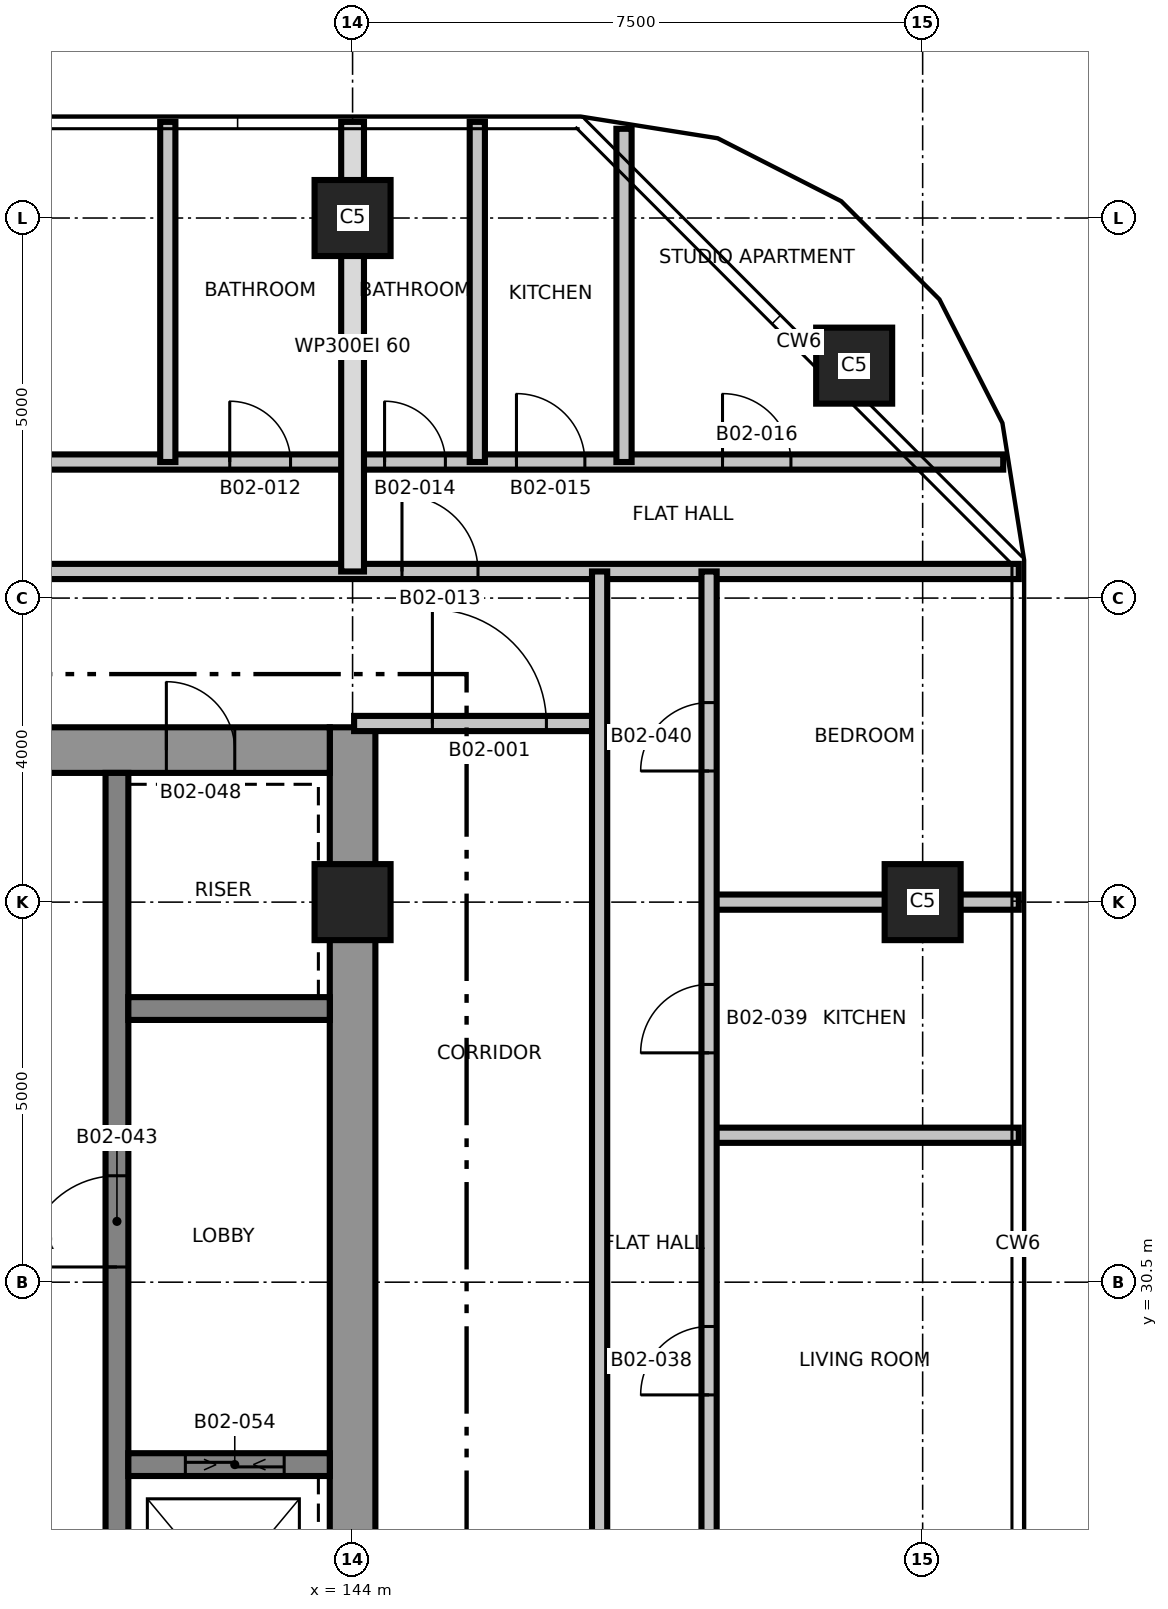
"""IFC4 building model, lengths in metres.
Left out: names, types, materials, properties, quantities, classifications, styles, units other than length and angle.
Written with IfcOpenShell. Run it as: python <this file> out.ifc"""

import sys

from ifc_helpers import new_model, si_unit, direction, frame, frame_2d, origin, origin_2d, place, context, subcontext, project, spatial, rectangle, extrude, element, fill, save


model = new_model("IFC4")
c1 = context("Model", 3, precision=1e-05, world=origin(), true_north=direction((0.0, 1.0)))
c2 = subcontext(c1, "Body", "Model", "MODEL_VIEW")
j1 = project(units=[si_unit("LENGTHUNIT", "METRE"), si_unit("PLANEANGLEUNIT", "RADIAN")], contexts=[c1])
p1 = place(None, origin())
s1 = spatial("IfcSite", under=j1, at=p1, CompositionType="ELEMENT")
p2 = place(p1, origin())
s2 = spatial("IfcBuilding", under=s1, at=p2, CompositionType="ELEMENT")
p3 = place(p2, frame((0.0, 0.0, 44.6)))
s3 = spatial("IfcBuildingStorey", under=s2, at=p3, CompositionType="ELEMENT", Elevation=44.6)
p4 = place(p3, frame((144.0, 24.2, 0.0), z_axis=(0.0, 0.0, 1.0), x_axis=(0.0, 1.0, 0.0)))
e1 = element("IfcWall", 1, at=p4, inside=s3, PredefinedType="SHEAR", context=c2, shape_type="SweptSolid", body=[
    extrude(rectangle(XDim=13.6, YDim=0.6, at=frame_2d((6.8, 0.0))), origin(), (0.0, 0.0, 1.0), 3.7),
])
p5 = place(p3, frame((128.7, 37.5, 0.0), z_axis=(0.0, 0.0, 1.0), x_axis=(1.0, 0.0, 0.0)))
e2 = element("IfcWall", 2, at=p5, inside=s3, PredefinedType="SHEAR", context=c2, shape_type="SweptSolid", body=[
    extrude(rectangle(XDim=15.0, YDim=0.6, at=frame_2d((7.5, 0.0))), origin(), (0.0, 0.0, 1.0), 3.7),
])
p6 = place(p5, frame((9.65, 0.0, 0.0)))
e3 = element("IfcOpeningElement", 3, at=p6, cuts=e2, PredefinedType="OPENING", context=c2, shape_type="SweptSolid", body=[
    extrude(rectangle(XDim=1.5, YDim=2.1, at=frame_2d((0.75, 1.05))), frame((0.0, 0.31, 0.0), z_axis=(0.0, -1.0, 0.0), x_axis=(1.0, 0.0, 0.0)), (0.0, 0.0, 1.0), 0.62),
])
p7 = place(p5, frame((12.85, 0.0, 0.0)))
e4 = element("IfcOpeningElement", 4, at=p7, cuts=e2, PredefinedType="OPENING", context=c2, shape_type="SweptSolid", body=[
    extrude(rectangle(XDim=0.9, YDim=2.1, at=frame_2d((0.45, 1.05))), frame((0.0, 0.31, 0.0), z_axis=(0.0, -1.0, 0.0), x_axis=(1.0, 0.0, 0.0)), (0.0, 0.0, 1.0), 0.62),
])
p8 = place(p5, frame((5.55, 0.0, 0.0)))
e5 = element("IfcOpeningElement", 5, at=p8, cuts=e2, PredefinedType="OPENING", context=c2, shape_type="SweptSolid", body=[
    extrude(rectangle(XDim=0.9, YDim=2.1, at=frame_2d((0.45, 1.05))), frame((0.0, 0.31, 0.0), z_axis=(0.0, -1.0, 0.0), x_axis=(1.0, 0.0, 0.0)), (0.0, 0.0, 1.0), 0.62),
])
p9 = place(p3, frame((140.9, 24.8, 0.0), z_axis=(0.0, 0.0, 1.0), x_axis=(0.0, 1.0, 0.0)))
e6 = element("IfcWall", 6, at=p9, inside=s3, PredefinedType="SHEAR", context=c2, shape_type="SweptSolid", body=[
    extrude(rectangle(XDim=12.4, YDim=0.3, at=frame_2d((6.2, 0.0))), origin(), (0.0, 0.0, 1.0), 3.7),
])
p10 = place(p9, frame((5.9, 0.0, 0.0)))
e7 = element("IfcOpeningElement", 7, at=p10, cuts=e6, PredefinedType="OPENING", context=c2, shape_type="SweptSolid", body=[
    extrude(rectangle(XDim=1.2, YDim=2.1, at=frame_2d((0.6, 1.05))), frame((0.0, 0.16, 0.0), z_axis=(0.0, -1.0, 0.0), x_axis=(1.0, 0.0, 0.0)), (0.0, 0.0, 1.0), 0.32),
])
p11 = place(p3, frame((141.05, 28.1, 0.0), z_axis=(0.0, 0.0, 1.0), x_axis=(1.0, 0.0, 0.0)))
e8 = element("IfcWall", 8, at=p11, inside=s3, PredefinedType="SHEAR", context=c2, shape_type="SweptSolid", body=[
    extrude(rectangle(XDim=2.65, YDim=0.3, at=frame_2d((1.325, 0.0))), origin(), (0.0, 0.0, 1.0), 3.7),
])
p12 = place(p11, frame((0.75, 0.0, 0.0)))
e9 = element("IfcOpeningElement", 9, at=p12, cuts=e8, PredefinedType="OPENING", context=c2, shape_type="SweptSolid", body=[
    extrude(rectangle(XDim=1.3, YDim=2.4, at=frame_2d((0.65, 1.2))), frame((0.0, 0.16, 0.0), z_axis=(0.0, -1.0, 0.0), x_axis=(1.0, 0.0, 0.0)), (0.0, 0.0, 1.0), 0.32),
])
p13 = place(p3, frame((141.05, 34.1, 0.0), z_axis=(0.0, 0.0, 1.0), x_axis=(1.0, 0.0, 0.0)))
e10 = element("IfcWall", 10, at=p13, inside=s3, PredefinedType="SHEAR", context=c2, shape_type="SweptSolid", body=[
    extrude(rectangle(XDim=2.65, YDim=0.3, at=frame_2d((1.325, 0.0))), origin(), (0.0, 0.0, 1.0), 3.7),
])
for number, where, z_axis, x_axis in (
    (11, (144.0, 35.5, 0.0), (0.0, 0.0, 1.0), (1.0, 0.0, 0.0)),
    (12, (151.5, 35.5, 0.0), (0.0, 0.0, 1.0), (1.0, 0.0, 0.0)),
    (13, (150.599, 42.558, 0.0), (0.0, 0.0, 1.0), (1.0, 0.0, 0.0)),
    (14, (144.0, 44.5, 0.0), (0.0, 0.0, 1.0), (1.0, 0.0, 0.0)),
):
    element("IfcColumn", number, at=place(p3, frame(where, z_axis=z_axis, x_axis=x_axis)), inside=s3, PredefinedType="COLUMN", context=c2, shape_type="SweptSolid", body=[
        extrude(rectangle(XDim=1.0, YDim=1.0, at=origin_2d()), origin(), (0.0, 0.0, 1.0), 3.7),
    ])
for number, where, z_axis, x_axis in (
    (15, (148.69, 32.433, 0.0), (0.0, 0.0, 1.0), (1.0, 0.0, 0.0)),
    (16, (148.69, 35.5, 0.0), (0.0, 0.0, 1.0), (1.0, 0.0, 0.0)),
):
    element("IfcWall", number, at=place(p3, frame(where, z_axis=z_axis, x_axis=x_axis)), inside=s3, PredefinedType="PARTITIONING", context=c2, shape_type="SweptSolid", body=[
        extrude(rectangle(XDim=4.075, YDim=0.2, at=frame_2d((2.038, 0.0))), origin(), (0.0, 0.0, 1.0), 3.4),
    ])
p14 = place(p3, frame((144.02, 37.85, 0.0), z_axis=(0.0, 0.0, 1.0), x_axis=(1.0, 0.0, 0.0)))
e17 = element("IfcWall", 17, at=p14, inside=s3, PredefinedType="PARTITIONING", context=c2, shape_type="SweptSolid", body=[
    extrude(rectangle(XDim=3.23, YDim=0.2, at=frame_2d((1.615, 0.0))), origin(), (0.0, 0.0, 1.0), 3.4),
])
p15 = place(p14, frame((1.03, 0.0, 0.0)))
e18 = element("IfcOpeningElement", 18, at=p15, cuts=e17, PredefinedType="OPENING", context=c2, shape_type="SweptSolid", body=[
    extrude(rectangle(XDim=1.5, YDim=2.1, at=frame_2d((0.75, 1.05))), frame((0.0, 0.11, 0.0), z_axis=(0.0, -1.0, 0.0), x_axis=(1.0, 0.0, 0.0)), (0.0, 0.0, 1.0), 0.22),
])
p16 = place(p3, frame((120.235, 39.85, 0.0), z_axis=(0.0, 0.0, 1.0), x_axis=(1.0, 0.0, 0.0)))
e19 = element("IfcWall", 19, at=p16, inside=s3, PredefinedType="PARTITIONING", context=c2, shape_type="SweptSolid", body=[
    extrude(rectangle(XDim=32.53, YDim=0.2, at=frame_2d((16.265, 0.0))), origin(), (0.0, 0.0, 1.0), 3.4),
])
p17 = place(p16, frame((7.115, 0.0, 0.0)))
e20 = element("IfcOpeningElement", 20, at=p17, cuts=e19, PredefinedType="OPENING", context=c2, shape_type="SweptSolid", body=[
    extrude(rectangle(XDim=1.0, YDim=2.1, at=frame_2d((0.5, 1.05))), frame((0.0, 0.11, 0.0), z_axis=(0.0, -1.0, 0.0), x_axis=(1.0, 0.0, 0.0)), (0.0, 0.0, 1.0), 0.22),
])
p18 = place(p16, frame((15.765, 0.0, 0.0)))
e21 = element("IfcOpeningElement", 21, at=p18, cuts=e19, PredefinedType="OPENING", context=c2, shape_type="SweptSolid", body=[
    extrude(rectangle(XDim=1.0, YDim=2.1, at=frame_2d((0.5, 1.05))), frame((0.0, 0.11, 0.0), z_axis=(0.0, -1.0, 0.0), x_axis=(1.0, 0.0, 0.0)), (0.0, 0.0, 1.0), 0.22),
])
p19 = place(p16, frame((24.415, 0.0, 0.0)))
e22 = element("IfcOpeningElement", 22, at=p19, cuts=e19, PredefinedType="OPENING", context=c2, shape_type="SweptSolid", body=[
    extrude(rectangle(XDim=1.0, YDim=2.1, at=frame_2d((0.5, 1.05))), frame((0.0, 0.11, 0.0), z_axis=(0.0, -1.0, 0.0), x_axis=(1.0, 0.0, 0.0)), (0.0, 0.0, 1.0), 0.22),
])
p20 = place(p3, frame((120.44, 41.29, 0.0), z_axis=(0.0, 0.0, 1.0), x_axis=(1.0, 0.0, 0.0)))
e23 = element("IfcWall", 23, at=p20, inside=s3, PredefinedType="PARTITIONING", context=c2, shape_type="SweptSolid", body=[
    extrude(rectangle(XDim=32.12, YDim=0.2, at=frame_2d((16.06, 0.0))), origin(), (0.0, 0.0, 1.0), 3.4),
])
p21 = place(p20, frame((2.793, 0.0, 0.0)))
e24 = element("IfcOpeningElement", 24, at=p21, cuts=e23, PredefinedType="OPENING", context=c2, shape_type="SweptSolid", body=[
    extrude(rectangle(XDim=0.9, YDim=2.1, at=frame_2d((0.45, 1.05))), frame((0.0, 0.11, 0.0), z_axis=(0.0, -1.0, 0.0), x_axis=(1.0, 0.0, 0.0)), (0.0, 0.0, 1.0), 0.22),
])
p22 = place(p20, frame((5.504, 0.0, 0.0)))
e25 = element("IfcOpeningElement", 25, at=p22, cuts=e23, PredefinedType="OPENING", context=c2, shape_type="SweptSolid", body=[
    extrude(rectangle(XDim=0.9, YDim=2.1, at=frame_2d((0.45, 1.05))), frame((0.0, 0.11, 0.0), z_axis=(0.0, -1.0, 0.0), x_axis=(1.0, 0.0, 0.0)), (0.0, 0.0, 1.0), 0.22),
])
p23 = place(p20, frame((7.339, 0.0, 0.0)))
e26 = element("IfcOpeningElement", 26, at=p23, cuts=e23, PredefinedType="OPENING", context=c2, shape_type="SweptSolid", body=[
    extrude(rectangle(XDim=0.8, YDim=2.1, at=frame_2d((0.4, 1.05))), frame((0.0, 0.11, 0.0), z_axis=(0.0, -1.0, 0.0), x_axis=(1.0, 0.0, 0.0)), (0.0, 0.0, 1.0), 0.22),
])
p24 = place(p20, frame((10.577, 0.0, 0.0)))
e27 = element("IfcOpeningElement", 27, at=p24, cuts=e23, PredefinedType="OPENING", context=c2, shape_type="SweptSolid", body=[
    extrude(rectangle(XDim=0.9, YDim=2.1, at=frame_2d((0.45, 1.05))), frame((0.0, 0.11, 0.0), z_axis=(0.0, -1.0, 0.0), x_axis=(1.0, 0.0, 0.0)), (0.0, 0.0, 1.0), 0.22),
])
p25 = place(p20, frame((14.327, 0.0, 0.0)))
e28 = element("IfcOpeningElement", 28, at=p25, cuts=e23, PredefinedType="OPENING", context=c2, shape_type="SweptSolid", body=[
    extrude(rectangle(XDim=0.9, YDim=2.1, at=frame_2d((0.45, 1.05))), frame((0.0, 0.11, 0.0), z_axis=(0.0, -1.0, 0.0), x_axis=(1.0, 0.0, 0.0)), (0.0, 0.0, 1.0), 0.22),
])
p26 = place(p20, frame((18.144, 0.0, 0.0)))
e29 = element("IfcOpeningElement", 29, at=p26, cuts=e23, PredefinedType="OPENING", context=c2, shape_type="SweptSolid", body=[
    extrude(rectangle(XDim=0.9, YDim=2.1, at=frame_2d((0.45, 1.05))), frame((0.0, 0.11, 0.0), z_axis=(0.0, -1.0, 0.0), x_axis=(1.0, 0.0, 0.0)), (0.0, 0.0, 1.0), 0.22),
])
p27 = place(p20, frame((21.944, 0.0, 0.0)))
e30 = element("IfcOpeningElement", 30, at=p27, cuts=e23, PredefinedType="OPENING", context=c2, shape_type="SweptSolid", body=[
    extrude(rectangle(XDim=0.8, YDim=2.1, at=frame_2d((0.4, 1.05))), frame((0.0, 0.11, 0.0), z_axis=(0.0, -1.0, 0.0), x_axis=(1.0, 0.0, 0.0)), (0.0, 0.0, 1.0), 0.22),
])
p28 = place(p20, frame((23.981, 0.0, 0.0)))
e31 = element("IfcOpeningElement", 31, at=p28, cuts=e23, PredefinedType="OPENING", context=c2, shape_type="SweptSolid", body=[
    extrude(rectangle(XDim=0.8, YDim=2.1, at=frame_2d((0.4, 1.05))), frame((0.0, 0.11, 0.0), z_axis=(0.0, -1.0, 0.0), x_axis=(1.0, 0.0, 0.0)), (0.0, 0.0, 1.0), 0.22),
])
p29 = place(p20, frame((25.716, 0.0, 0.0)))
e32 = element("IfcOpeningElement", 32, at=p29, cuts=e23, PredefinedType="OPENING", context=c2, shape_type="SweptSolid", body=[
    extrude(rectangle(XDim=0.9, YDim=2.1, at=frame_2d((0.45, 1.05))), frame((0.0, 0.11, 0.0), z_axis=(0.0, -1.0, 0.0), x_axis=(1.0, 0.0, 0.0)), (0.0, 0.0, 1.0), 0.22),
])
p30 = place(p20, frame((28.427, 0.0, 0.0)))
e33 = element("IfcOpeningElement", 33, at=p30, cuts=e23, PredefinedType="OPENING", context=c2, shape_type="SweptSolid", body=[
    extrude(rectangle(XDim=0.9, YDim=2.1, at=frame_2d((0.45, 1.05))), frame((0.0, 0.11, 0.0), z_axis=(0.0, -1.0, 0.0), x_axis=(1.0, 0.0, 0.0)), (0.0, 0.0, 1.0), 0.22),
])
p31 = place(p3, frame((141.569, 41.29, 0.0), z_axis=(0.0, 0.0, 1.0), x_axis=(0.0, 1.0, 0.0)))
e34 = element("IfcWall", 34, at=p31, inside=s3, PredefinedType="PARTITIONING", context=c2, shape_type="SweptSolid", body=[
    extrude(rectangle(XDim=4.475, YDim=0.2, at=frame_2d((2.237, 0.0))), origin(), (0.0, 0.0, 1.0), 3.4),
])
p32 = place(p3, frame((144.0, 39.85, 0.0), z_axis=(0.0, 0.0, 1.0), x_axis=(0.0, 1.0, 0.0)))
e35 = element("IfcWall", 35, at=p32, inside=s3, PredefinedType="PARTITIONING", context=c2, shape_type="SweptSolid", body=[
    extrude(rectangle(XDim=5.915, YDim=0.3, at=frame_2d((2.958, 0.0))), origin(), (0.0, 0.0, 1.0), 3.4),
])
p33 = place(p3, frame((145.641, 41.29, 0.0), z_axis=(0.0, 0.0, 1.0), x_axis=(0.0, 1.0, 0.0)))
e36 = element("IfcWall", 36, at=p33, inside=s3, PredefinedType="PARTITIONING", context=c2, shape_type="SweptSolid", body=[
    extrude(rectangle(XDim=4.475, YDim=0.2, at=frame_2d((2.237, 0.0))), origin(), (0.0, 0.0, 1.0), 3.4),
])
p34 = place(p3, frame((147.25, 22.15, 0.0), z_axis=(0.0, 0.0, 1.0), x_axis=(0.0, 1.0, 0.0)))
e37 = element("IfcWall", 37, at=p34, inside=s3, PredefinedType="PARTITIONING", context=c2, shape_type="SweptSolid", body=[
    extrude(rectangle(XDim=17.7, YDim=0.2, at=frame_2d((8.85, 0.0))), origin(), (0.0, 0.0, 1.0), 3.4),
])
p35 = place(p34, frame((2.65, 0.0, 0.0)))
e38 = element("IfcOpeningElement", 38, at=p35, cuts=e37, PredefinedType="OPENING", context=c2, shape_type="SweptSolid", body=[
    extrude(rectangle(XDim=1.0, YDim=2.1, at=frame_2d((0.5, 1.05))), frame((0.0, 0.11, 0.0), z_axis=(0.0, -1.0, 0.0), x_axis=(1.0, 0.0, 0.0)), (0.0, 0.0, 1.0), 0.22),
])
p36 = place(p3, frame((147.571, 41.29, 0.0), z_axis=(0.0, 0.0, 1.0), x_axis=(0.0, 1.0, 0.0)))
e39 = element("IfcWall", 39, at=p36, inside=s3, PredefinedType="PARTITIONING", context=c2, shape_type="SweptSolid", body=[
    extrude(rectangle(XDim=4.384, YDim=0.2, at=frame_2d((2.192, 0.0))), origin(), (0.0, 0.0, 1.0), 3.4),
])
p37 = place(p3, frame((148.69, 22.15, 0.0), z_axis=(0.0, 0.0, 1.0), x_axis=(0.0, 1.0, 0.0)))
e40 = element("IfcWall", 40, at=p37, inside=s3, PredefinedType="PARTITIONING", context=c2, shape_type="SweptSolid", body=[
    extrude(rectangle(XDim=17.7, YDim=0.2, at=frame_2d((8.85, 0.0))), origin(), (0.0, 0.0, 1.0), 3.4),
])
p38 = place(p37, frame((1.028, 0.0, 0.0)))
e41 = element("IfcOpeningElement", 41, at=p38, cuts=e40, PredefinedType="OPENING", context=c2, shape_type="SweptSolid", body=[
    extrude(rectangle(XDim=0.9, YDim=2.1, at=frame_2d((0.45, 1.05))), frame((0.0, 0.11, 0.0), z_axis=(0.0, -1.0, 0.0), x_axis=(1.0, 0.0, 0.0)), (0.0, 0.0, 1.0), 0.22),
])
p39 = place(p37, frame((3.253, 0.0, 0.0)))
e42 = element("IfcOpeningElement", 42, at=p39, cuts=e40, PredefinedType="OPENING", context=c2, shape_type="SweptSolid", body=[
    extrude(rectangle(XDim=0.8, YDim=2.1, at=frame_2d((0.4, 1.05))), frame((0.0, 0.11, 0.0), z_axis=(0.0, -1.0, 0.0), x_axis=(1.0, 0.0, 0.0)), (0.0, 0.0, 1.0), 0.22),
])
p40 = place(p37, frame((6.867, 0.0, 0.0)))
e43 = element("IfcOpeningElement", 43, at=p40, cuts=e40, PredefinedType="OPENING", context=c2, shape_type="SweptSolid", body=[
    extrude(rectangle(XDim=0.9, YDim=2.1, at=frame_2d((0.45, 1.05))), frame((0.0, 0.11, 0.0), z_axis=(0.0, -1.0, 0.0), x_axis=(1.0, 0.0, 0.0)), (0.0, 0.0, 1.0), 0.22),
])
p41 = place(p37, frame((11.367, 0.0, 0.0)))
e44 = element("IfcOpeningElement", 44, at=p41, cuts=e40, PredefinedType="OPENING", context=c2, shape_type="SweptSolid", body=[
    extrude(rectangle(XDim=0.9, YDim=2.1, at=frame_2d((0.45, 1.05))), frame((0.0, 0.11, 0.0), z_axis=(0.0, -1.0, 0.0), x_axis=(1.0, 0.0, 0.0)), (0.0, 0.0, 1.0), 0.22),
])
p42 = place(p37, frame((15.075, 0.0, 0.0)))
e45 = element("IfcOpeningElement", 45, at=p42, cuts=e40, PredefinedType="OPENING", context=c2, shape_type="SweptSolid", body=[
    extrude(rectangle(XDim=0.9, YDim=2.1, at=frame_2d((0.45, 1.05))), frame((0.0, 0.11, 0.0), z_axis=(0.0, -1.0, 0.0), x_axis=(1.0, 0.0, 0.0)), (0.0, 0.0, 1.0), 0.22),
])
p43 = place(p15, origin())
e46 = element("IfcDoor", 46, at=p43, inside=s3, OperationType="SINGLE_SWING_LEFT", PredefinedType="DOOR", context=c2, shape_type="SweptSolid", body=[
    extrude(rectangle(XDim=1.5, YDim=2.1, at=frame_2d((0.75, 1.05))), frame((0.0, 0.025, 0.0), z_axis=(0.0, -1.0, 0.0), x_axis=(1.0, 0.0, 0.0)), (0.0, 0.0, 1.0), 0.05),
])
fill(e18, e46)
p44 = place(p27, origin())
e47 = element("IfcDoor", 47, at=p44, inside=s3, OperationType="SINGLE_SWING_RIGHT", PredefinedType="DOOR", context=c2, shape_type="SweptSolid", body=[
    extrude(rectangle(XDim=0.8, YDim=2.1, at=frame_2d((0.4, 1.05))), frame((0.0, 0.025, 0.0), z_axis=(0.0, -1.0, 0.0), x_axis=(1.0, 0.0, 0.0)), (0.0, 0.0, 1.0), 0.05),
])
fill(e30, e47)
p45 = place(p19, origin())
e48 = element("IfcDoor", 48, at=p45, inside=s3, OperationType="SINGLE_SWING_LEFT", PredefinedType="DOOR", context=c2, shape_type="SweptSolid", body=[
    extrude(rectangle(XDim=1.0, YDim=2.1, at=frame_2d((0.5, 1.05))), frame((0.0, 0.025, 0.0), z_axis=(0.0, -1.0, 0.0), x_axis=(1.0, 0.0, 0.0)), (0.0, 0.0, 1.0), 0.05),
])
fill(e22, e48)
p46 = place(p28, origin())
e49 = element("IfcDoor", 49, at=p46, inside=s3, OperationType="SINGLE_SWING_RIGHT", PredefinedType="DOOR", context=c2, shape_type="SweptSolid", body=[
    extrude(rectangle(XDim=0.8, YDim=2.1, at=frame_2d((0.4, 1.05))), frame((0.0, 0.025, 0.0), z_axis=(0.0, -1.0, 0.0), x_axis=(1.0, 0.0, 0.0)), (0.0, 0.0, 1.0), 0.05),
])
fill(e31, e49)
p47 = place(p29, origin())
e50 = element("IfcDoor", 50, at=p47, inside=s3, OperationType="SINGLE_SWING_LEFT", PredefinedType="DOOR", context=c2, shape_type="SweptSolid", body=[
    extrude(rectangle(XDim=0.9, YDim=2.1, at=frame_2d((0.45, 1.05))), frame((0.0, 0.025, 0.0), z_axis=(0.0, -1.0, 0.0), x_axis=(1.0, 0.0, 0.0)), (0.0, 0.0, 1.0), 0.05),
])
fill(e32, e50)
p48 = place(p30, origin())
e51 = element("IfcDoor", 51, at=p48, inside=s3, OperationType="SINGLE_SWING_RIGHT", PredefinedType="DOOR", context=c2, shape_type="SweptSolid", body=[
    extrude(rectangle(XDim=0.9, YDim=2.1, at=frame_2d((0.45, 1.05))), frame((0.0, 0.025, 0.0), z_axis=(0.0, -1.0, 0.0), x_axis=(1.0, 0.0, 0.0)), (0.0, 0.0, 1.0), 0.05),
])
fill(e33, e51)
p49 = place(p40, origin())
e52 = element("IfcDoor", 52, at=p49, inside=s3, OperationType="SINGLE_SWING_RIGHT", PredefinedType="DOOR", context=c2, shape_type="SweptSolid", body=[
    extrude(rectangle(XDim=0.9, YDim=2.1, at=frame_2d((0.45, 1.05))), frame((0.0, 0.025, 0.0), z_axis=(0.0, -1.0, 0.0), x_axis=(1.0, 0.0, 0.0)), (0.0, 0.0, 1.0), 0.05),
])
fill(e43, e52)
p50 = place(p41, origin())
e53 = element("IfcDoor", 53, at=p50, inside=s3, OperationType="SINGLE_SWING_LEFT", PredefinedType="DOOR", context=c2, shape_type="SweptSolid", body=[
    extrude(rectangle(XDim=0.9, YDim=2.1, at=frame_2d((0.45, 1.05))), frame((0.0, 0.025, 0.0), z_axis=(0.0, -1.0, 0.0), x_axis=(1.0, 0.0, 0.0)), (0.0, 0.0, 1.0), 0.05),
])
fill(e44, e53)
p51 = place(p42, origin())
e54 = element("IfcDoor", 54, at=p51, inside=s3, OperationType="SINGLE_SWING_RIGHT", PredefinedType="DOOR", context=c2, shape_type="SweptSolid", body=[
    extrude(rectangle(XDim=0.9, YDim=2.1, at=frame_2d((0.45, 1.05))), frame((0.0, 0.025, 0.0), z_axis=(0.0, -1.0, 0.0), x_axis=(1.0, 0.0, 0.0)), (0.0, 0.0, 1.0), 0.05),
])
fill(e45, e54)
p52 = place(p10, origin())
e55 = element("IfcDoor", 55, at=p52, inside=s3, OperationType="SINGLE_SWING_RIGHT", PredefinedType="DOOR", context=c2, shape_type="SweptSolid", body=[
    extrude(rectangle(XDim=1.2, YDim=2.1, at=frame_2d((0.6, 1.05))), frame((0.0, 0.025, 0.0), z_axis=(0.0, -1.0, 0.0), x_axis=(1.0, 0.0, 0.0)), (0.0, 0.0, 1.0), 0.05),
])
fill(e7, e55)
p53 = place(p7, origin())
e56 = element("IfcDoor", 56, at=p53, inside=s3, OperationType="SINGLE_SWING_RIGHT", PredefinedType="DOOR", context=c2, shape_type="SweptSolid", body=[
    extrude(rectangle(XDim=0.9, YDim=2.1, at=frame_2d((0.45, 1.05))), frame((0.0, 0.025, 0.0), z_axis=(0.0, -1.0, 0.0), x_axis=(1.0, 0.0, 0.0)), (0.0, 0.0, 1.0), 0.05),
])
fill(e4, e56)
p54 = place(p12, origin())
e57 = element("IfcDoor", 57, at=p54, inside=s3, OperationType="SLIDING_TO_LEFT", PredefinedType="DOOR", context=c2, shape_type="SweptSolid", body=[
    extrude(rectangle(XDim=1.3, YDim=2.4, at=frame_2d((0.65, 1.2))), frame((0.0, 0.025, 0.0), z_axis=(0.0, -1.0, 0.0), x_axis=(1.0, 0.0, 0.0)), (0.0, 0.0, 1.0), 0.05),
])
fill(e9, e57)
save(model, sys.argv[1])
